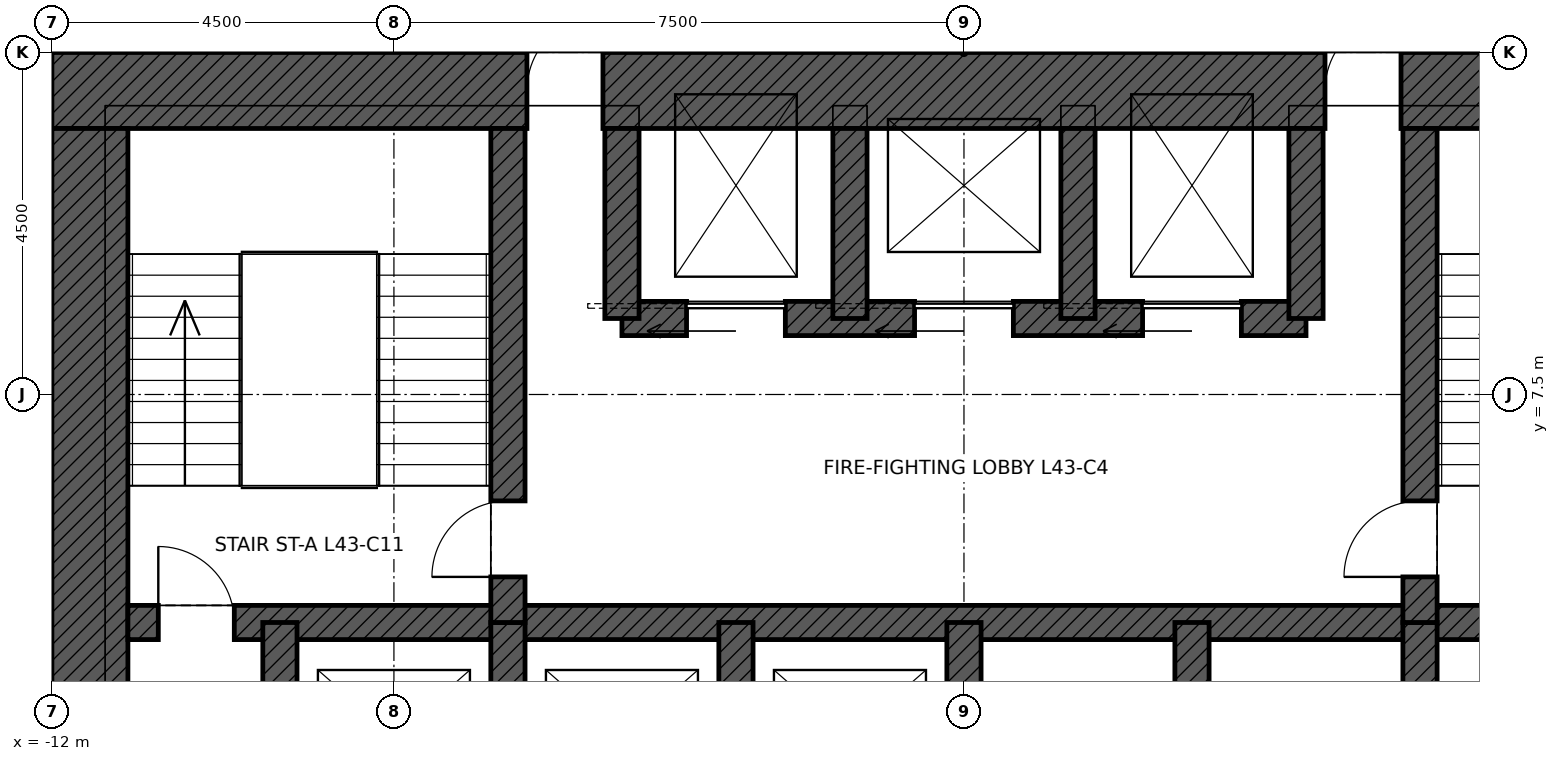
"""IFC4 building model, lengths in metres.
Left out: names, types, materials, properties, quantities, classifications, styles, units other than length and angle.
Written with IfcOpenShell. Run it as: python <this file> out.ifc"""

import sys

from ifc_helpers import new_model, si_unit, direction, frame, frame_2d, origin, place, context, subcontext, project, spatial, rectangle, extrude, element, fill, save


model = new_model("IFC4")
c1 = context("Model", 3, precision=1e-05, world=origin(), true_north=direction((0.0, 1.0)))
c2 = subcontext(c1, "Body", "Model", "MODEL_VIEW")
j1 = project(units=[si_unit("LENGTHUNIT", "METRE"), si_unit("PLANEANGLEUNIT", "RADIAN")], contexts=[c1])
p1 = place(None, origin())
s1 = spatial("IfcSite", under=j1, at=p1, CompositionType="ELEMENT")
p2 = place(p1, origin())
s2 = spatial("IfcBuilding", under=s1, at=p2, CompositionType="ELEMENT")
p3 = place(p2, frame((0.0, 0.0, 205.9)))
s3 = spatial("IfcBuildingStorey", under=s2, at=p3, CompositionType="ELEMENT", Elevation=205.9)
p4 = place(p3, frame((-12.0, 11.5, 0.0), z_axis=(0.0, 0.0, 1.0), x_axis=(1.0, 0.0, 0.0)))
e1 = element("IfcWall", 1, at=p4, inside=s3, PredefinedType="SHEAR", context=c2, shape_type="SweptSolid", body=[
    extrude(rectangle(XDim=24.0, YDim=1.0, at=frame_2d((12.0, 0.0))), origin(), (0.0, 0.0, 1.0), 4.0),
])
p5 = place(p4, frame((6.25, 0.0, 0.0)))
e2 = element("IfcOpeningElement", 2, at=p5, cuts=e1, PredefinedType="OPENING", context=c2, shape_type="SweptSolid", body=[
    extrude(rectangle(XDim=1.0, YDim=2.4, at=frame_2d((0.5, 1.2))), frame((0.0, 0.51, 0.0), z_axis=(0.0, -1.0, 0.0), x_axis=(1.0, 0.0, 0.0)), (0.0, 0.0, 1.0), 1.02),
])
p6 = place(p4, frame((16.75, 0.0, 0.0)))
e3 = element("IfcOpeningElement", 3, at=p6, cuts=e1, PredefinedType="OPENING", context=c2, shape_type="SweptSolid", body=[
    extrude(rectangle(XDim=1.0, YDim=2.4, at=frame_2d((0.5, 1.2))), frame((0.0, 0.51, 0.0), z_axis=(0.0, -1.0, 0.0), x_axis=(1.0, 0.0, 0.0)), (0.0, 0.0, 1.0), 1.02),
])
p7 = place(p3, frame((-11.5, -11.0, 0.0), z_axis=(0.0, 0.0, 1.0), x_axis=(0.0, 1.0, 0.0)))
e4 = element("IfcWall", 4, at=p7, inside=s3, PredefinedType="SHEAR", context=c2, shape_type="SweptSolid", body=[
    extrude(rectangle(XDim=22.0, YDim=1.0, at=frame_2d((11.0, 0.0))), origin(), (0.0, 0.0, 1.0), 4.0),
])
p8 = place(p7, frame((10.5, 0.0, 0.0)))
e5 = element("IfcOpeningElement", 5, at=p8, cuts=e4, PredefinedType="OPENING", context=c2, shape_type="SweptSolid", body=[
    extrude(rectangle(XDim=1.0, YDim=2.4, at=frame_2d((0.5, 1.2))), frame((0.0, 0.51, 0.0), z_axis=(0.0, -1.0, 0.0), x_axis=(1.0, 0.0, 0.0)), (0.0, 0.0, 1.0), 1.02),
])
p9 = place(p3, frame((-11.0, 4.5, 0.0), z_axis=(0.0, 0.0, 1.0), x_axis=(1.0, 0.0, 0.0)))
e6 = element("IfcWall", 6, at=p9, inside=s3, PredefinedType="SHEAR", context=c2, shape_type="SweptSolid", body=[
    extrude(rectangle(XDim=22.0, YDim=0.45, at=frame_2d((11.0, 0.0))), origin(), (0.0, 0.0, 1.0), 4.0),
])
p10 = place(p9, frame((0.4, 0.0, 0.0)))
e7 = element("IfcOpeningElement", 7, at=p10, cuts=e6, PredefinedType="OPENING", context=c2, shape_type="SweptSolid", body=[
    extrude(rectangle(XDim=1.0, YDim=2.1, at=frame_2d((0.5, 1.05))), frame((0.0, 0.235, 0.0), z_axis=(0.0, -1.0, 0.0), x_axis=(1.0, 0.0, 0.0)), (0.0, 0.0, 1.0), 0.47),
])
p11 = place(p9, frame((20.6, 0.0, 0.0)))
e8 = element("IfcOpeningElement", 8, at=p11, cuts=e6, PredefinedType="OPENING", context=c2, shape_type="SweptSolid", body=[
    extrude(rectangle(XDim=1.0, YDim=2.1, at=frame_2d((0.5, 1.05))), frame((0.0, 0.235, 0.0), z_axis=(0.0, -1.0, 0.0), x_axis=(1.0, 0.0, 0.0)), (0.0, 0.0, 1.0), 0.47),
])
p12 = place(p3, frame((-4.5, 8.5, 0.0), z_axis=(0.0, 0.0, 1.0), x_axis=(1.0, 0.0, 0.0)))
e9 = element("IfcWall", 9, at=p12, inside=s3, PredefinedType="SHEAR", context=c2, shape_type="SweptSolid", body=[
    extrude(rectangle(XDim=9.0, YDim=0.45, at=frame_2d((4.5, 0.0))), origin(), (0.0, 0.0, 1.0), 4.0),
])
p13 = place(p12, frame((0.85, 0.0, 0.0)))
e10 = element("IfcOpeningElement", 10, at=p13, cuts=e9, PredefinedType="OPENING", context=c2, shape_type="SweptSolid", body=[
    extrude(rectangle(XDim=1.3, YDim=2.4, at=frame_2d((0.65, 1.2))), frame((0.0, 0.235, 0.0), z_axis=(0.0, -1.0, 0.0), x_axis=(1.0, 0.0, 0.0)), (0.0, 0.0, 1.0), 0.47),
])
p14 = place(p12, frame((6.85, 0.0, 0.0)))
e11 = element("IfcOpeningElement", 11, at=p14, cuts=e9, PredefinedType="OPENING", context=c2, shape_type="SweptSolid", body=[
    extrude(rectangle(XDim=1.3, YDim=2.4, at=frame_2d((0.65, 1.2))), frame((0.0, 0.235, 0.0), z_axis=(0.0, -1.0, 0.0), x_axis=(1.0, 0.0, 0.0)), (0.0, 0.0, 1.0), 0.47),
])
p15 = place(p12, frame((3.85, 0.0, 0.0)))
e12 = element("IfcOpeningElement", 12, at=p15, cuts=e9, PredefinedType="OPENING", context=c2, shape_type="SweptSolid", body=[
    extrude(rectangle(XDim=1.3, YDim=2.4, at=frame_2d((0.65, 1.2))), frame((0.0, 0.235, 0.0), z_axis=(0.0, -1.0, 0.0), x_axis=(1.0, 0.0, 0.0)), (0.0, 0.0, 1.0), 0.47),
])
for number, where, z_axis, x_axis in (
    (13, (-9.0, 1.5, 0.0), (0.0, 0.0, 1.0), (0.0, 1.0, 0.0)),
    (14, (-6.0, 1.5, 0.0), (0.0, 0.0, 1.0), (0.0, 1.0, 0.0)),
    (15, (-3.0, 1.5, 0.0), (0.0, 0.0, 1.0), (0.0, 1.0, 0.0)),
    (16, (0.0, 1.5, 0.0), (0.0, 0.0, 1.0), (0.0, 1.0, 0.0)),
    (17, (3.0, 1.5, 0.0), (0.0, 0.0, 1.0), (0.0, 1.0, 0.0)),
    (18, (6.0, 1.5, 0.0), (0.0, 0.0, 1.0), (0.0, 1.0, 0.0)),
):
    element("IfcWall", number, at=place(p3, frame(where, z_axis=z_axis, x_axis=x_axis)), inside=s3, PredefinedType="SHEAR", context=c2, shape_type="SweptSolid", body=[
        extrude(rectangle(XDim=3.0, YDim=0.45, at=frame_2d((1.5, 0.0))), origin(), (0.0, 0.0, 1.0), 4.0),
    ])
p16 = place(p3, frame((-6.0, 4.5, 0.0), z_axis=(0.0, 0.0, 1.0), x_axis=(0.0, 1.0, 0.0)))
e19 = element("IfcWall", 19, at=p16, inside=s3, PredefinedType="SHEAR", context=c2, shape_type="SweptSolid", body=[
    extrude(rectangle(XDim=6.5, YDim=0.45, at=frame_2d((3.25, 0.0))), origin(), (0.0, 0.0, 1.0), 4.0),
])
p17 = place(p16, frame((0.6, 0.0, 0.0)))
e20 = element("IfcOpeningElement", 20, at=p17, cuts=e19, PredefinedType="OPENING", context=c2, shape_type="SweptSolid", body=[
    extrude(rectangle(XDim=1.0, YDim=2.1, at=frame_2d((0.5, 1.05))), frame((0.0, 0.235, 0.0), z_axis=(0.0, -1.0, 0.0), x_axis=(1.0, 0.0, 0.0)), (0.0, 0.0, 1.0), 0.47),
])
p18 = place(p3, frame((6.0, 4.5, 0.0), z_axis=(0.0, 0.0, 1.0), x_axis=(0.0, 1.0, 0.0)))
e21 = element("IfcWall", 21, at=p18, inside=s3, PredefinedType="SHEAR", context=c2, shape_type="SweptSolid", body=[
    extrude(rectangle(XDim=6.5, YDim=0.45, at=frame_2d((3.25, 0.0))), origin(), (0.0, 0.0, 1.0), 4.0),
])
p19 = place(p18, frame((0.6, 0.0, 0.0)))
e22 = element("IfcOpeningElement", 22, at=p19, cuts=e21, PredefinedType="OPENING", context=c2, shape_type="SweptSolid", body=[
    extrude(rectangle(XDim=1.0, YDim=2.1, at=frame_2d((0.5, 1.05))), frame((0.0, 0.235, 0.0), z_axis=(0.0, -1.0, 0.0), x_axis=(1.0, 0.0, 0.0)), (0.0, 0.0, 1.0), 0.47),
])
for number, where, z_axis, x_axis in (
    (23, (-4.5, 8.5, 0.0), (0.0, 0.0, 1.0), (0.0, 1.0, 0.0)),
    (24, (4.5, 8.5, 0.0), (0.0, 0.0, 1.0), (0.0, 1.0, 0.0)),
    (25, (-1.5, 8.5, 0.0), (0.0, 0.0, 1.0), (0.0, 1.0, 0.0)),
    (26, (1.5, 8.5, 0.0), (0.0, 0.0, 1.0), (0.0, 1.0, 0.0)),
):
    element("IfcWall", number, at=place(p3, frame(where, z_axis=z_axis, x_axis=x_axis)), inside=s3, PredefinedType="SHEAR", context=c2, shape_type="SweptSolid", body=[
        extrude(rectangle(XDim=2.5, YDim=0.45, at=frame_2d((1.25, 0.0))), origin(), (0.0, 0.0, 1.0), 4.0),
    ])
p20 = place(p10, origin())
e27 = element("IfcDoor", 27, at=p20, inside=s3, OperationType="SINGLE_SWING_LEFT", PredefinedType="DOOR", context=c2, shape_type="SweptSolid", body=[
    extrude(rectangle(XDim=1.0, YDim=2.1, at=frame_2d((0.5, 1.05))), frame((0.0, 0.025, 0.0), z_axis=(0.0, -1.0, 0.0), x_axis=(1.0, 0.0, 0.0)), (0.0, 0.0, 1.0), 0.05),
])
fill(e7, e27)
p21 = place(p17, origin())
e28 = element("IfcDoor", 28, at=p21, inside=s3, OperationType="SINGLE_SWING_LEFT", PredefinedType="DOOR", context=c2, shape_type="SweptSolid", body=[
    extrude(rectangle(XDim=1.0, YDim=2.1, at=frame_2d((0.5, 1.05))), frame((0.0, 0.025, 0.0), z_axis=(0.0, -1.0, 0.0), x_axis=(1.0, 0.0, 0.0)), (0.0, 0.0, 1.0), 0.05),
])
fill(e20, e28)
p22 = place(p19, origin())
e29 = element("IfcDoor", 29, at=p22, inside=s3, OperationType="SINGLE_SWING_LEFT", PredefinedType="DOOR", context=c2, shape_type="SweptSolid", body=[
    extrude(rectangle(XDim=1.0, YDim=2.1, at=frame_2d((0.5, 1.05))), frame((0.0, 0.025, 0.0), z_axis=(0.0, -1.0, 0.0), x_axis=(1.0, 0.0, 0.0)), (0.0, 0.0, 1.0), 0.05),
])
fill(e22, e29)
p23 = place(p5, origin())
e30 = element("IfcDoor", 30, at=p23, inside=s3, OperationType="SINGLE_SWING_RIGHT", PredefinedType="DOOR", context=c2, shape_type="SweptSolid", body=[
    extrude(rectangle(XDim=1.0, YDim=2.4, at=frame_2d((0.5, 1.2))), frame((0.0, 0.485, 0.0), z_axis=(0.0, -1.0, 0.0), x_axis=(1.0, 0.0, 0.0)), (0.0, 0.0, 1.0), 0.05),
])
fill(e2, e30)
p24 = place(p6, origin())
e31 = element("IfcDoor", 31, at=p24, inside=s3, OperationType="SINGLE_SWING_RIGHT", PredefinedType="DOOR", context=c2, shape_type="SweptSolid", body=[
    extrude(rectangle(XDim=1.0, YDim=2.4, at=frame_2d((0.5, 1.2))), frame((0.0, 0.485, 0.0), z_axis=(0.0, -1.0, 0.0), x_axis=(1.0, 0.0, 0.0)), (0.0, 0.0, 1.0), 0.05),
])
fill(e3, e31)
p25 = place(p13, origin())
e32 = element("IfcDoor", 32, at=p25, inside=s3, OperationType="SLIDING_TO_LEFT", PredefinedType="DOOR", context=c2, shape_type="SweptSolid", body=[
    extrude(rectangle(XDim=1.3, YDim=2.4, at=frame_2d((0.65, 1.2))), frame((0.0, 0.025, 0.0), z_axis=(0.0, -1.0, 0.0), x_axis=(1.0, 0.0, 0.0)), (0.0, 0.0, 1.0), 0.05),
])
fill(e10, e32)
p26 = place(p14, origin())
e33 = element("IfcDoor", 33, at=p26, inside=s3, OperationType="SLIDING_TO_LEFT", PredefinedType="DOOR", context=c2, shape_type="SweptSolid", body=[
    extrude(rectangle(XDim=1.3, YDim=2.4, at=frame_2d((0.65, 1.2))), frame((0.0, 0.025, 0.0), z_axis=(0.0, -1.0, 0.0), x_axis=(1.0, 0.0, 0.0)), (0.0, 0.0, 1.0), 0.05),
])
fill(e11, e33)
p27 = place(p15, origin())
e34 = element("IfcDoor", 34, at=p27, inside=s3, OperationType="SLIDING_TO_LEFT", PredefinedType="DOOR", context=c2, shape_type="SweptSolid", body=[
    extrude(rectangle(XDim=1.3, YDim=2.4, at=frame_2d((0.65, 1.2))), frame((0.0, 0.025, 0.0), z_axis=(0.0, -1.0, 0.0), x_axis=(1.0, 0.0, 0.0)), (0.0, 0.0, 1.0), 0.05),
])
fill(e12, e34)
save(model, sys.argv[1])
